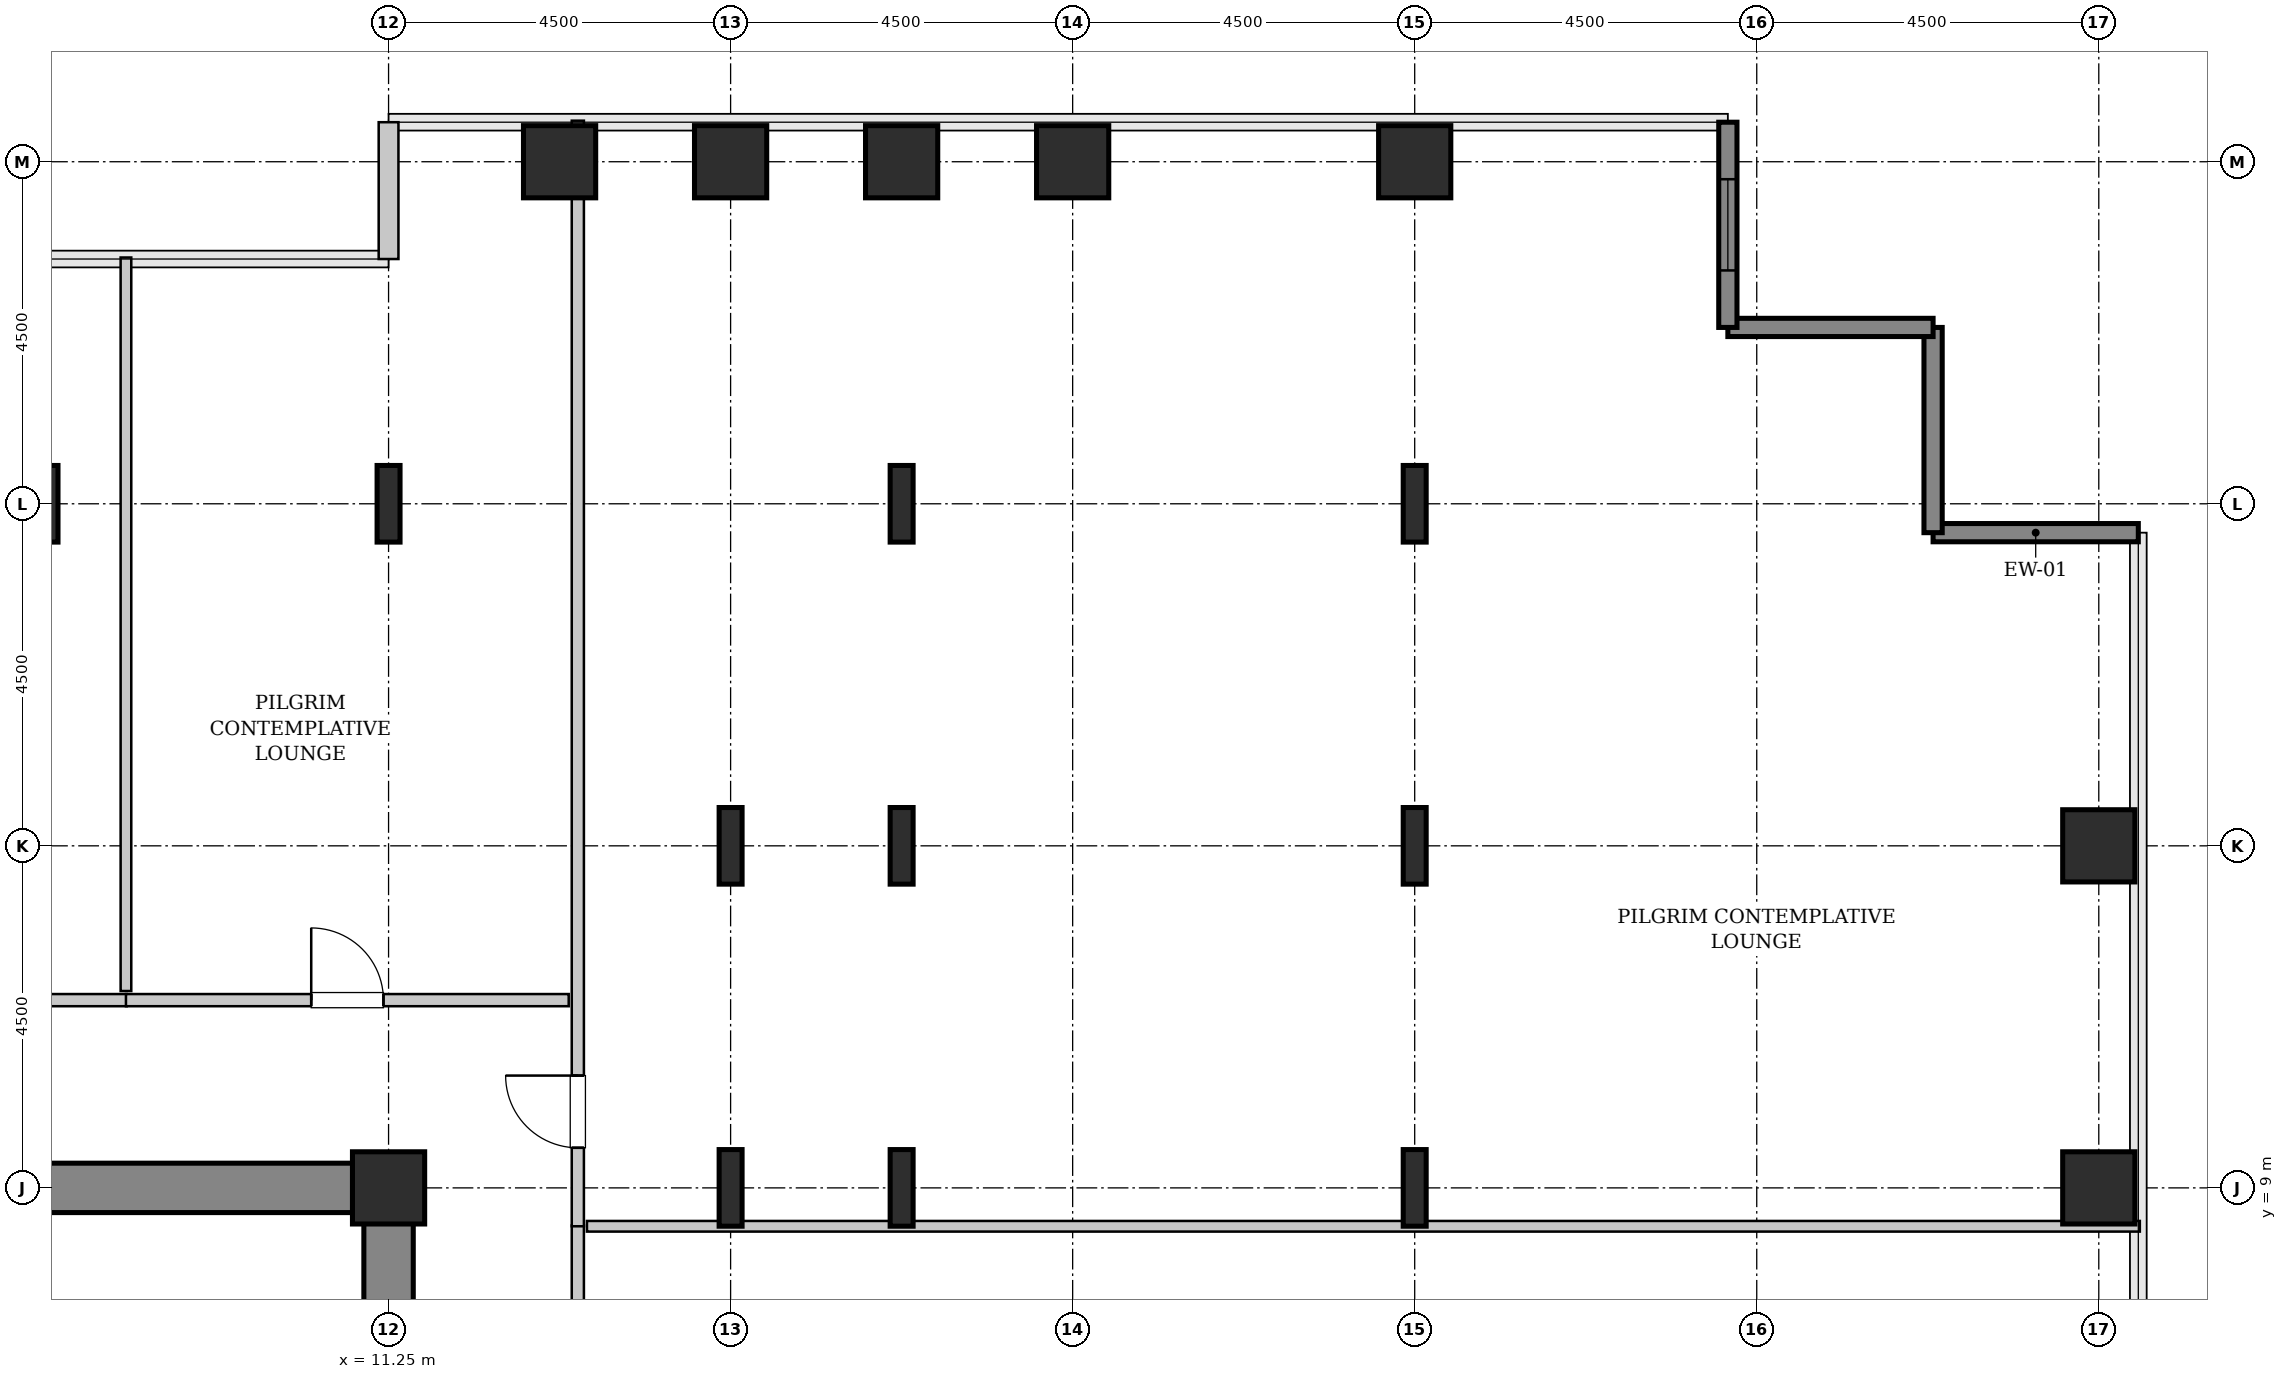
"""IFC4 building model, lengths in metres.
Left out: names, types, materials, properties, quantities, classifications, styles, units other than length and angle.
Written with IfcOpenShell. Run it as: python <this file> out.ifc"""

import sys

from ifc_helpers import new_model, si_unit, direction, frame, frame_2d, origin, origin_2d, place, context, subcontext, project, spatial, rectangle, hollow_rectangle, i_section, extrude, source, transform, mapped, element, fill, save


model = new_model("IFC4")
c1 = context("Model", 3, precision=1e-05, world=origin(), true_north=direction((0.0, 1.0)))
c2 = subcontext(c1, "Body", "Model", "MODEL_VIEW")
j1 = project(units=[si_unit("LENGTHUNIT", "METRE"), si_unit("PLANEANGLEUNIT", "RADIAN")], contexts=[c1])
p1 = place(None, origin())
s1 = spatial("IfcSite", under=j1, at=p1, CompositionType="ELEMENT")
p2 = place(p1, origin())
s2 = spatial("IfcBuilding", under=s1, at=p2, CompositionType="ELEMENT")
p3 = place(p2, frame((0.0, 0.0, 59.6)))
s3 = spatial("IfcBuildingStorey", under=s2, at=p3, CompositionType="ELEMENT", Elevation=59.6)
m1 = source(origin(), c2, "Body", "SweptSolid", [
    extrude(rectangle(XDim=10.025, YDim=0.65, at=frame_2d((5.012, 0.0))), origin(), (0.0, 0.0, 1.0), 3.8),
])
p4 = place(p3, frame((1.55, 9.0, 0.0), z_axis=(0.0, 0.0, 1.0), x_axis=(1.0, 0.0, 0.0)))
e1 = element("IfcWall", 1, at=p4, inside=s3, PredefinedType="SHEAR", context=c2, shape_type="MappedRepresentation", body=[
    mapped(m1, transform((0.0, 0.0, 0.0), x_axis=(1.0, 0.0, 0.0), y_axis=(0.0, 1.0, 0.0), z_axis=(0.0, 0.0, 1.0), scale=1.0)),
])
m2 = source(origin(), c2, "Body", "SweptSolid", [
    extrude(rectangle(XDim=7.325, YDim=0.65, at=frame_2d((3.663, 0.0))), origin(), (0.0, 0.0, 1.0), 3.8),
])
p5 = place(p3, frame((11.25, 1.35, 0.0), z_axis=(0.0, 0.0, 1.0), x_axis=(0.0, 1.0, 0.0)))
e2 = element("IfcWall", 2, at=p5, inside=s3, PredefinedType="SHEAR", context=c2, shape_type="MappedRepresentation", body=[
    mapped(m2, transform((0.0, 0.0, 0.0), x_axis=(1.0, 0.0, 0.0), y_axis=(0.0, 1.0, 0.0), z_axis=(0.0, 0.0, 1.0), scale=1.0)),
])
m3 = source(origin(), c2, "Body", "SweptSolid", [
    extrude(i_section(OverallWidth=0.302, OverallDepth=1.008, WebThickness=0.021, FlangeThickness=0.04, FilletRadius=0.03, at=origin_2d()), origin(), (0.0, 0.0, 1.0), 3.8),
])
p6 = place(p3, frame((6.75, 18.0, 0.0), z_axis=(0.0, 0.0, 1.0), x_axis=(1.0, 0.0, 0.0)))
e3 = element("IfcColumn", 3, at=p6, inside=s3, PredefinedType="COLUMN", context=c2, shape_type="MappedRepresentation", body=[
    mapped(m3, transform((0.0, 0.0, 0.0), x_axis=(1.0, 0.0, 0.0), y_axis=(0.0, 1.0, 0.0), z_axis=(0.0, 0.0, 1.0), scale=1.0)),
])
m4 = source(origin(), c2, "Body", "SweptSolid", [
    extrude(hollow_rectangle(XDim=0.95, YDim=0.95, WallThickness=0.045, InnerFilletRadius=0.045, OuterFilletRadius=0.09, at=origin_2d()), origin(), (0.0, 0.0, 1.0), 3.8),
])
p7 = place(p3, frame((11.25, 9.0, 0.0), z_axis=(0.0, 0.0, 1.0), x_axis=(1.0, 0.0, 0.0)))
e4 = element("IfcColumn", 4, at=p7, inside=s3, PredefinedType="COLUMN", context=c2, shape_type="MappedRepresentation", body=[
    mapped(m4, transform((0.0, 0.0, 0.0), x_axis=(1.0, 0.0, 0.0), y_axis=(0.0, 1.0, 0.0), z_axis=(0.0, 0.0, 1.0), scale=1.0)),
])
p8 = place(p3, frame((11.25, 18.0, 0.0), z_axis=(0.0, 0.0, 1.0), x_axis=(1.0, 0.0, 0.0)))
e5 = element("IfcColumn", 5, at=p8, inside=s3, PredefinedType="COLUMN", context=c2, shape_type="MappedRepresentation", body=[
    mapped(m3, transform((0.0, 0.0, 0.0), x_axis=(1.0, 0.0, 0.0), y_axis=(0.0, 1.0, 0.0), z_axis=(0.0, 0.0, 1.0), scale=1.0)),
])
m5 = source(origin(), c2, "Body", "SweptSolid", [
    extrude(hollow_rectangle(XDim=0.95, YDim=0.95, WallThickness=0.045, InnerFilletRadius=0.045, OuterFilletRadius=0.09, at=origin_2d()), origin(), (0.0, 0.0, 1.0), 3.8),
])
p9 = place(p3, frame((13.5, 22.5, 0.0), z_axis=(0.0, 0.0, 1.0), x_axis=(1.0, 0.0, 0.0)))
e6 = element("IfcColumn", 6, at=p9, inside=s3, PredefinedType="COLUMN", context=c2, shape_type="MappedRepresentation", body=[
    mapped(m5, transform((0.0, 0.0, 0.0), x_axis=(1.0, 0.0, 0.0), y_axis=(0.0, 1.0, 0.0), z_axis=(0.0, 0.0, 1.0), scale=1.0)),
])
for number, where, z_axis, x_axis in (
    (7, (15.75, 9.0, 0.0), (0.0, 0.0, 1.0), (1.0, 0.0, 0.0)),
    (8, (15.75, 13.5, 0.0), (0.0, 0.0, 1.0), (1.0, 0.0, 0.0)),
):
    element("IfcColumn", number, at=place(p3, frame(where, z_axis=z_axis, x_axis=x_axis)), inside=s3, PredefinedType="COLUMN", context=c2, shape_type="MappedRepresentation", body=[
        mapped(m3, transform((0.0, 0.0, 0.0), x_axis=(1.0, 0.0, 0.0), y_axis=(0.0, 1.0, 0.0), z_axis=(0.0, 0.0, 1.0), scale=1.0)),
    ])
p10 = place(p3, frame((15.75, 22.5, 0.0), z_axis=(0.0, 0.0, 1.0), x_axis=(1.0, 0.0, 0.0)))
e9 = element("IfcColumn", 9, at=p10, inside=s3, PredefinedType="COLUMN", context=c2, shape_type="MappedRepresentation", body=[
    mapped(m5, transform((0.0, 0.0, 0.0), x_axis=(1.0, 0.0, 0.0), y_axis=(0.0, 1.0, 0.0), z_axis=(0.0, 0.0, 1.0), scale=1.0)),
])
for number, where, z_axis, x_axis in (
    (10, (18.0, 9.0, 0.0), (0.0, 0.0, 1.0), (1.0, 0.0, 0.0)),
    (11, (18.0, 13.5, 0.0), (0.0, 0.0, 1.0), (1.0, 0.0, 0.0)),
    (12, (18.0, 18.0, 0.0), (0.0, 0.0, 1.0), (1.0, 0.0, 0.0)),
):
    element("IfcColumn", number, at=place(p3, frame(where, z_axis=z_axis, x_axis=x_axis)), inside=s3, PredefinedType="COLUMN", context=c2, shape_type="MappedRepresentation", body=[
        mapped(m3, transform((0.0, 0.0, 0.0), x_axis=(1.0, 0.0, 0.0), y_axis=(0.0, 1.0, 0.0), z_axis=(0.0, 0.0, 1.0), scale=1.0)),
    ])
for number, where, z_axis, x_axis in (
    (13, (18.0, 22.5, 0.0), (0.0, 0.0, 1.0), (1.0, 0.0, 0.0)),
    (14, (20.25, 22.5, 0.0), (0.0, 0.0, 1.0), (1.0, 0.0, 0.0)),
):
    element("IfcColumn", number, at=place(p3, frame(where, z_axis=z_axis, x_axis=x_axis)), inside=s3, PredefinedType="COLUMN", context=c2, shape_type="MappedRepresentation", body=[
        mapped(m5, transform((0.0, 0.0, 0.0), x_axis=(1.0, 0.0, 0.0), y_axis=(0.0, 1.0, 0.0), z_axis=(0.0, 0.0, 1.0), scale=1.0)),
    ])
for number, where, z_axis, x_axis in (
    (15, (24.75, 9.0, 0.0), (0.0, 0.0, 1.0), (1.0, 0.0, 0.0)),
    (16, (24.75, 13.5, 0.0), (0.0, 0.0, 1.0), (1.0, 0.0, 0.0)),
    (17, (24.75, 18.0, 0.0), (0.0, 0.0, 1.0), (1.0, 0.0, 0.0)),
):
    element("IfcColumn", number, at=place(p3, frame(where, z_axis=z_axis, x_axis=x_axis)), inside=s3, PredefinedType="COLUMN", context=c2, shape_type="MappedRepresentation", body=[
        mapped(m3, transform((0.0, 0.0, 0.0), x_axis=(1.0, 0.0, 0.0), y_axis=(0.0, 1.0, 0.0), z_axis=(0.0, 0.0, 1.0), scale=1.0)),
    ])
for number, where, z_axis, x_axis in (
    (18, (24.75, 22.5, 0.0), (0.0, 0.0, 1.0), (1.0, 0.0, 0.0)),
    (19, (33.75, 9.0, 0.0), (0.0, 0.0, 1.0), (1.0, 0.0, 0.0)),
    (20, (33.75, 13.5, 0.0), (0.0, 0.0, 1.0), (1.0, 0.0, 0.0)),
):
    element("IfcColumn", number, at=place(p3, frame(where, z_axis=z_axis, x_axis=x_axis)), inside=s3, PredefinedType="COLUMN", context=c2, shape_type="MappedRepresentation", body=[
        mapped(m5, transform((0.0, 0.0, 0.0), x_axis=(1.0, 0.0, 0.0), y_axis=(0.0, 1.0, 0.0), z_axis=(0.0, 0.0, 1.0), scale=1.0)),
    ])
m6 = source(origin(), c2, "Body", "SweptSolid", [
    extrude(rectangle(XDim=2.7, YDim=0.24, at=frame_2d((1.35, 0.0))), origin(), (0.0, 0.0, 1.0), 3.55),
])
for number, where, z_axis, x_axis in (
    (21, (34.27, 17.62, 0.0), (0.0, 0.0, 1.0), (-1.0, 0.0, 0.0)),
    (22, (31.57, 17.62, 0.0), (0.0, 0.0, 1.0), (0.0, 1.0, 0.0)),
    (23, (31.57, 20.32, 0.0), (0.0, 0.0, 1.0), (-1.0, 0.0, 0.0)),
):
    element("IfcWall", number, at=place(p3, frame(where, z_axis=z_axis, x_axis=x_axis)), inside=s3, PredefinedType="SHEAR", context=c2, shape_type="MappedRepresentation", body=[
        mapped(m6, transform((0.0, 0.0, 0.0), x_axis=(1.0, 0.0, 0.0), y_axis=(0.0, 1.0, 0.0), z_axis=(0.0, 0.0, 1.0), scale=1.0)),
    ])
p11 = place(p3, frame((28.87, 20.32, 0.0), z_axis=(0.0, 0.0, 1.0), x_axis=(0.0, 1.0, 0.0)))
e24 = element("IfcWall", 24, at=p11, inside=s3, PredefinedType="SHEAR", context=c2, shape_type="MappedRepresentation", body=[
    mapped(m6, transform((0.0, 0.0, 0.0), x_axis=(1.0, 0.0, 0.0), y_axis=(0.0, 1.0, 0.0), z_axis=(0.0, 0.0, 1.0), scale=1.0)),
])
p12 = place(p11, frame((0.75, 0.0, 0.85)))
e25 = element("IfcOpeningElement", 25, at=p12, cuts=e24, PredefinedType="OPENING", context=c2, shape_type="SweptSolid", body=[
    extrude(rectangle(XDim=1.2, YDim=1.8, at=frame_2d((0.6, 0.9))), frame((0.0, 0.13, 0.0), z_axis=(0.0, -1.0, 0.0), x_axis=(1.0, 0.0, 0.0)), (0.0, 0.0, 1.0), 0.26),
])
m7 = source(origin(), c2, "Body", "SweptSolid", [
    extrude(rectangle(XDim=1.8, YDim=0.26, at=frame_2d((0.9, 0.0))), origin(), (0.0, 0.0, 1.0), 3.55),
])
p13 = place(p3, frame((11.25, 23.02, 0.0), z_axis=(0.0, 0.0, 1.0), x_axis=(0.0, -1.0, 0.0)))
e26 = element("IfcWall", 26, at=p13, inside=s3, PredefinedType="SOLIDWALL", context=c2, shape_type="MappedRepresentation", body=[
    mapped(m7, transform((0.0, 0.0, 0.0), x_axis=(1.0, 0.0, 0.0), y_axis=(0.0, 1.0, 0.0), z_axis=(0.0, 0.0, 1.0), scale=1.0)),
])
m8 = source(origin(), c2, "Body", "SweptSolid", [
    extrude(rectangle(XDim=3.31, YDim=0.16, at=frame_2d((1.655, 0.0))), origin(), (0.0, 0.0, 1.0), 3.535),
])
p14 = place(p3, frame((13.74, 5.195, 0.0), z_axis=(0.0, 0.0, 1.0), x_axis=(0.0, 1.0, 0.0)))
e27 = element("IfcWall", 27, at=p14, inside=s3, PredefinedType="PARTITIONING", context=c2, shape_type="MappedRepresentation", body=[
    mapped(m8, transform((0.0, 0.0, 0.0), x_axis=(1.0, 0.0, 0.0), y_axis=(0.0, 1.0, 0.0), z_axis=(0.0, 0.0, 1.0), scale=1.0)),
])
p15 = place(p14, frame((1.18, 0.0, 0.0)))
e28 = element("IfcOpeningElement", 28, at=p15, cuts=e27, PredefinedType="OPENING", context=c2, shape_type="SweptSolid", body=[
    extrude(rectangle(XDim=0.95, YDim=2.1, at=frame_2d((0.475, 1.05))), frame((0.0, 0.09, 0.0), z_axis=(0.0, -1.0, 0.0), x_axis=(1.0, 0.0, 0.0)), (0.0, 0.0, 1.0), 0.18),
])
m9 = source(origin(), c2, "Body", "SweptSolid", [
    extrude(rectangle(XDim=20.43, YDim=0.14, at=frame_2d((10.215, 0.0))), origin(), (0.0, 0.0, 1.0), 2.825),
])
p16 = place(p3, frame((13.86, 8.495, 0.0), z_axis=(0.0, 0.0, 1.0), x_axis=(1.0, 0.0, 0.0)))
e29 = element("IfcWall", 29, at=p16, inside=s3, PredefinedType="PARTITIONING", context=c2, shape_type="MappedRepresentation", body=[
    mapped(m9, transform((0.0, 0.0, 0.0), x_axis=(1.0, 0.0, 0.0), y_axis=(0.0, 1.0, 0.0), z_axis=(0.0, 0.0, 1.0), scale=1.0)),
])
m10 = source(origin(), c2, "Body", "SweptSolid", [
    extrude(rectangle(XDim=14.545, YDim=0.16, at=frame_2d((7.272, 0.0))), origin(), (0.0, 0.0, 1.0), 3.535),
])
p17 = place(p3, frame((13.74, 8.495, 0.0), z_axis=(0.0, 0.0, 1.0), x_axis=(0.0, 1.0, 0.0)))
e30 = element("IfcWall", 30, at=p17, inside=s3, PredefinedType="PARTITIONING", context=c2, shape_type="MappedRepresentation", body=[
    mapped(m10, transform((0.0, 0.0, 0.0), x_axis=(1.0, 0.0, 0.0), y_axis=(0.0, 1.0, 0.0), z_axis=(0.0, 0.0, 1.0), scale=1.0)),
])
p18 = place(p17, frame((1.032, 0.0, 0.0)))
e31 = element("IfcOpeningElement", 31, at=p18, cuts=e30, PredefinedType="OPENING", context=c2, shape_type="SweptSolid", body=[
    extrude(rectangle(XDim=0.95, YDim=2.1, at=frame_2d((0.475, 1.05))), frame((0.0, 0.09, 0.0), z_axis=(0.0, -1.0, 0.0), x_axis=(1.0, 0.0, 0.0)), (0.0, 0.0, 1.0), 0.18),
])
m11 = source(origin(), c2, "Body", "SweptSolid", [
    extrude(rectangle(XDim=6.01, YDim=0.16, at=frame_2d((3.005, 0.0))), origin(), (0.0, 0.0, 1.0), 3.535),
])
p19 = place(p3, frame((1.795, 11.47, 0.0), z_axis=(0.0, 0.0, 1.0), x_axis=(1.0, 0.0, 0.0)))
e32 = element("IfcWall", 32, at=p19, inside=s3, PredefinedType="PARTITIONING", context=c2, shape_type="MappedRepresentation", body=[
    mapped(m11, transform((0.0, 0.0, 0.0), x_axis=(1.0, 0.0, 0.0), y_axis=(0.0, 1.0, 0.0), z_axis=(0.0, 0.0, 1.0), scale=1.0)),
])
p20 = place(p19, frame((2.53, 0.0, 0.0)))
e33 = element("IfcOpeningElement", 33, at=p20, cuts=e32, PredefinedType="OPENING", context=c2, shape_type="SweptSolid", body=[
    extrude(rectangle(XDim=0.95, YDim=2.1, at=frame_2d((0.475, 1.05))), frame((0.0, 0.09, 0.0), z_axis=(0.0, -1.0, 0.0), x_axis=(1.0, 0.0, 0.0)), (0.0, 0.0, 1.0), 0.18),
])
m12 = source(origin(), c2, "Body", "SweptSolid", [
    extrude(rectangle(XDim=9.65, YDim=0.14, at=frame_2d((4.825, 0.0))), origin(), (0.0, 0.0, 1.0), 3.535),
])
p21 = place(p3, frame((7.795, 11.59, 0.0), z_axis=(0.0, 0.0, 1.0), x_axis=(0.0, 1.0, 0.0)))
e34 = element("IfcWall", 34, at=p21, inside=s3, PredefinedType="PARTITIONING", context=c2, shape_type="MappedRepresentation", body=[
    mapped(m12, transform((0.0, 0.0, 0.0), x_axis=(1.0, 0.0, 0.0), y_axis=(0.0, 1.0, 0.0), z_axis=(0.0, 0.0, 1.0), scale=1.0)),
])
m13 = source(origin(), c2, "Body", "SweptSolid", [
    extrude(rectangle(XDim=5.825, YDim=0.16, at=frame_2d((2.913, 0.0))), origin(), (0.0, 0.0, 1.0), 3.535),
])
p22 = place(p3, frame((7.795, 11.47, 0.0), z_axis=(0.0, 0.0, 1.0), x_axis=(1.0, 0.0, 0.0)))
e35 = element("IfcWall", 35, at=p22, inside=s3, PredefinedType="PARTITIONING", context=c2, shape_type="MappedRepresentation", body=[
    mapped(m13, transform((0.0, 0.0, 0.0), x_axis=(1.0, 0.0, 0.0), y_axis=(0.0, 1.0, 0.0), z_axis=(0.0, 0.0, 1.0), scale=1.0)),
])
p23 = place(p22, frame((2.438, 0.0, 0.0)))
e36 = element("IfcOpeningElement", 36, at=p23, cuts=e35, PredefinedType="OPENING", context=c2, shape_type="SweptSolid", body=[
    extrude(rectangle(XDim=0.95, YDim=2.1, at=frame_2d((0.475, 1.05))), frame((0.0, 0.09, 0.0), z_axis=(0.0, -1.0, 0.0), x_axis=(1.0, 0.0, 0.0)), (0.0, 0.0, 1.0), 0.18),
])
m14 = source(origin(), c2, "Body", "SweptSolid", [
    extrude(rectangle(XDim=1.2, YDim=1.8, at=frame_2d((0.6, 0.9))), frame((0.0, 0.03, 0.0), z_axis=(0.0, -1.0, 0.0), x_axis=(1.0, 0.0, 0.0)), (0.0, 0.0, 1.0), 0.06),
])
p24 = place(p12, origin())
e37 = element("IfcWindow", 37, at=p24, inside=s3, PartitioningType="SINGLE_PANEL", PredefinedType="WINDOW", context=c2, shape_type="MappedRepresentation", body=[
    mapped(m14, transform((0.0, 0.0, 0.0), x_axis=(1.0, 0.0, 0.0), y_axis=(0.0, 1.0, 0.0), z_axis=(0.0, 0.0, 1.0), scale=1.0)),
])
fill(e25, e37)
m15 = source(origin(), c2, "Body", "SweptSolid", [
    extrude(rectangle(XDim=0.95, YDim=2.1, at=frame_2d((0.475, 1.05))), frame((0.0, 0.025, 0.0), z_axis=(0.0, -1.0, 0.0), x_axis=(1.0, 0.0, 0.0)), (0.0, 0.0, 1.0), 0.05),
])
p25 = place(p18, origin())
e38 = element("IfcDoor", 38, at=p25, inside=s3, OperationType="SINGLE_SWING_RIGHT", PredefinedType="DOOR", context=c2, shape_type="MappedRepresentation", body=[
    mapped(m15, transform((0.0, 0.0, 0.0), x_axis=(1.0, 0.0, 0.0), y_axis=(0.0, 1.0, 0.0), z_axis=(0.0, 0.0, 1.0), scale=1.0)),
])
fill(e31, e38)
p26 = place(p23, origin())
e39 = element("IfcDoor", 39, at=p26, inside=s3, OperationType="SINGLE_SWING_LEFT", PredefinedType="DOOR", context=c2, shape_type="MappedRepresentation", body=[
    mapped(m15, transform((0.0, 0.0, 0.0), x_axis=(1.0, 0.0, 0.0), y_axis=(0.0, 1.0, 0.0), z_axis=(0.0, 0.0, 1.0), scale=1.0)),
])
fill(e36, e39)
save(model, sys.argv[1])
